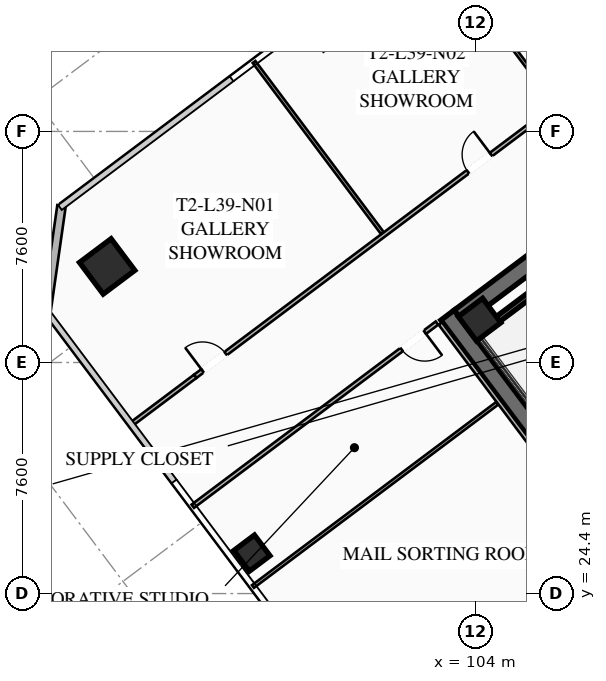
"""IFC4 building model, lengths in metres.
Left out: names, types, materials, properties, quantities, classifications, styles, units other than length and angle.
Written with IfcOpenShell. Run it as: python <this file> out.ifc"""

import sys

from ifc_helpers import new_model, si_unit, direction, frame, frame_2d, origin, origin_2d, place, context, subcontext, project, spatial, rectangle, hollow_rectangle, extrude, element, fill, save


model = new_model("IFC4")
c1 = context("Model", 3, precision=1e-05, world=origin(), true_north=direction((0.0, 1.0)))
c2 = subcontext(c1, "Body", "Model", "MODEL_VIEW")
j1 = project(units=[si_unit("LENGTHUNIT", "METRE"), si_unit("PLANEANGLEUNIT", "RADIAN")], contexts=[c1])
p1 = place(None, origin())
s1 = spatial("IfcSite", under=j1, at=p1, CompositionType="ELEMENT")
p2 = place(p1, origin())
s2 = spatial("IfcBuilding", under=s1, at=p2, CompositionType="ELEMENT")
p3 = place(p2, frame((0.0, 0.0, 146.35)))
s3 = spatial("IfcBuildingStorey", under=s2, at=p3, CompositionType="ELEMENT", Elevation=146.35)
p4 = place(p3, frame((112.436, 21.077, 0.0), z_axis=(0.0, 0.0, 1.0), x_axis=(-0.600005007985, 0.799996243986, 0.0)))
e1 = element("IfcWall", 1, at=p4, inside=s3, PredefinedType="SHEAR", context=c2, shape_type="SweptSolid", body=[
    extrude(rectangle(XDim=15.6, YDim=0.55, at=frame_2d((7.8, 0.0))), origin(), (0.0, 0.0, 1.0), 3.55),
])
p5 = place(p3, frame((103.461, 33.502, 0.0), z_axis=(0.0, 0.0, 1.0), x_axis=(0.799998054672, 0.600002593761, 0.0)))
e2 = element("IfcWall", 2, at=p5, inside=s3, PredefinedType="SHEAR", context=c2, shape_type="SweptSolid", body=[
    extrude(rectangle(XDim=15.06, YDim=0.55, at=frame_2d((7.53, 0.0))), origin(), (0.0, 0.0, 1.0), 3.55),
])
p6 = place(p5, frame((4.58, 0.0, 0.0)))
e3 = element("IfcOpeningElement", 3, at=p6, cuts=e2, PredefinedType="OPENING", context=c2, shape_type="SweptSolid", body=[
    extrude(rectangle(XDim=1.25, YDim=2.25, at=frame_2d((0.625, 1.125))), frame((0.0, 0.285, 0.0), z_axis=(0.0, -1.0, 0.0), x_axis=(1.0, 0.0, 0.0)), (0.0, 0.0, 1.0), 0.57),
])
p7 = place(p5, frame((9.63, 0.0, 0.0)))
e4 = element("IfcOpeningElement", 4, at=p7, cuts=e2, PredefinedType="OPENING", context=c2, shape_type="SweptSolid", body=[
    extrude(rectangle(XDim=1.25, YDim=2.25, at=frame_2d((0.625, 1.125))), frame((0.0, 0.285, 0.0), z_axis=(0.0, -1.0, 0.0), x_axis=(1.0, 0.0, 0.0)), (0.0, 0.0, 1.0), 0.57),
])
p8 = place(p3, frame((104.13, 33.41, 0.0), z_axis=(0.0, 0.0, 1.0), x_axis=(0.799999996291, 0.600000004945, 0.0)))
e5 = element("IfcColumn", 5, at=p8, inside=s3, PredefinedType="COLUMN", context=c2, shape_type="SweptSolid", body=[
    extrude(hollow_rectangle(XDim=1.0, YDim=1.0, WallThickness=0.04, at=origin_2d()), origin(), (0.0, 0.0, 1.0), 3.37),
])
p9 = place(p3, frame((91.88, 35.16, 0.0), z_axis=(0.0, 0.0, 1.0), x_axis=(0.799999996291, 0.600000004945, 0.0)))
e6 = element("IfcColumn", 6, at=p9, inside=s3, PredefinedType="COLUMN", context=c2, shape_type="SweptSolid", body=[
    extrude(hollow_rectangle(XDim=1.3, YDim=1.3, WallThickness=0.05, at=origin_2d()), origin(), (0.0, 0.0, 1.0), 3.37),
])
p10 = place(p3, frame((96.64, 25.73, 0.0), z_axis=(0.0, 0.0, 1.0), x_axis=(0.799999996291, 0.600000004945, 0.0)))
e7 = element("IfcColumn", 7, at=p10, inside=s3, PredefinedType="COLUMN", context=c2, shape_type="SweptSolid", body=[
    extrude(hollow_rectangle(XDim=0.85, YDim=0.85, WallThickness=0.035, at=origin_2d()), origin(), (0.0, 0.0, 1.0), 3.37),
])
p11 = place(p3, frame((89.88, 33.66, 0.0), z_axis=(0.0, 0.0, 1.0), x_axis=(0.141421356237, 0.989949493661, 0.0)))
e8 = element("IfcWall", 8, at=p11, inside=s3, PredefinedType="SOLIDWALL", context=c2, shape_type="SweptSolid", body=[
    extrude(rectangle(XDim=3.536, YDim=0.28, at=frame_2d((1.768, 0.0))), origin(), (0.0, 0.0, 1.0), 3.37),
])
p12 = place(p3, frame((103.956, 32.842, 0.0), z_axis=(0.0, 0.0, 1.0), x_axis=(0.800015298837, 0.599979601008, 0.0)))
e9 = element("IfcWall", 9, at=p12, inside=s3, PredefinedType="SHEAR", context=c2, shape_type="SweptSolid", body=[
    extrude(rectangle(XDim=3.83, YDim=0.2, at=frame_2d((1.915, 0.0))), origin(), (0.0, 0.0, 1.0), 3.37),
])
p13 = place(p3, frame((94.778, 31.546, 0.0), z_axis=(0.0, 0.0, 1.0), x_axis=(0.8, 0.6, 0.0)))
e10 = element("IfcWall", 10, at=p13, inside=s3, PredefinedType="PARTITIONING", context=c2, shape_type="SweptSolid", body=[
    extrude(rectangle(XDim=31.3, YDim=0.135, at=frame_2d((15.65, 0.0))), origin(), (0.0, 0.0, 1.0), 2.723),
])
p14 = place(p13, frame((0.3, 0.0, 0.0)))
e11 = element("IfcOpeningElement", 11, at=p14, cuts=e10, PredefinedType="OPENING", context=c2, shape_type="SweptSolid", body=[
    extrude(rectangle(XDim=0.95, YDim=2.05, at=frame_2d((0.475, 1.025))), frame((0.0, 0.077, 0.0), z_axis=(0.0, -1.0, 0.0), x_axis=(1.0, 0.0, 0.0)), (0.0, 0.0, 1.0), 0.155),
])
p15 = place(p13, frame((11.21, 0.0, 0.0)))
e12 = element("IfcOpeningElement", 12, at=p15, cuts=e10, PredefinedType="OPENING", context=c2, shape_type="SweptSolid", body=[
    extrude(rectangle(XDim=0.95, YDim=2.05, at=frame_2d((0.475, 1.025))), frame((0.0, 0.077, 0.0), z_axis=(0.0, -1.0, 0.0), x_axis=(1.0, 0.0, 0.0)), (0.0, 0.0, 1.0), 0.155),
])
p16 = place(p13, frame((15.487, 0.0, 0.0)))
e13 = element("IfcOpeningElement", 13, at=p16, cuts=e10, PredefinedType="OPENING", context=c2, shape_type="SweptSolid", body=[
    extrude(rectangle(XDim=0.95, YDim=2.05, at=frame_2d((0.475, 1.025))), frame((0.0, 0.077, 0.0), z_axis=(0.0, -1.0, 0.0), x_axis=(1.0, 0.0, 0.0)), (0.0, 0.0, 1.0), 0.155),
])
p17 = place(p13, frame((30.05, 0.0, 0.0)))
e14 = element("IfcOpeningElement", 14, at=p17, cuts=e10, PredefinedType="OPENING", context=c2, shape_type="SweptSolid", body=[
    extrude(rectangle(XDim=0.95, YDim=2.05, at=frame_2d((0.475, 1.025))), frame((0.0, 0.077, 0.0), z_axis=(0.0, -1.0, 0.0), x_axis=(1.0, 0.0, 0.0)), (0.0, 0.0, 1.0), 0.155),
])
p18 = place(p3, frame((92.674, 29.968, 0.0), z_axis=(0.0, 0.0, 1.0), x_axis=(0.80002227902, 0.599970293491, 0.0)))
e15 = element("IfcWall", 15, at=p18, inside=s3, PredefinedType="PARTITIONING", context=c2, shape_type="SweptSolid", body=[
    extrude(rectangle(XDim=2.63, YDim=0.135, at=frame_2d((1.315, 0.0))), origin(), (0.0, 0.0, 1.0), 2.723),
])
for number, where, z_axis, x_axis in (
    (16, (100.93, 36.26, 0.0), (0.0, 0.0, 1.0), (-0.6, 0.8, 0.0)),
    (17, (106.61, 40.52, 0.0), (0.0, 0.0, 1.0), (-0.6, 0.8, 0.0)),
):
    element("IfcWall", number, at=place(p3, frame(where, z_axis=z_axis, x_axis=x_axis)), inside=s3, PredefinedType="PARTITIONING", context=c2, shape_type="SweptSolid", body=[
        extrude(rectangle(XDim=7.03, YDim=0.11, at=frame_2d((3.515, 0.0))), origin(), (0.0, 0.0, 1.0), 2.723),
    ])
p19 = place(p3, frame((112.104, 20.928, 0.0), z_axis=(0.0, 0.0, 1.0), x_axis=(-0.599994940075, 0.800003794918, 0.0)))
e18 = element("IfcWall", 18, at=p19, inside=s3, PredefinedType="PARTITIONING", context=c2, shape_type="SweptSolid", body=[
    extrude(rectangle(XDim=15.44, YDim=0.135, at=frame_2d((7.72, 0.0))), origin(), (0.0, 0.0, 1.0), 2.723),
])
p20 = place(p3, frame((102.728, 33.296, 0.0), z_axis=(0.0, 0.0, 1.0), x_axis=(-0.800002918023, -0.599996109283, 0.0)))
e19 = element("IfcWall", 19, at=p20, inside=s3, PredefinedType="PARTITIONING", context=c2, shape_type="SweptSolid", body=[
    extrude(rectangle(XDim=10.04, YDim=0.135, at=frame_2d((5.02, 0.0))), origin(), (0.0, 0.0, 1.0), 2.723),
])
p21 = place(p20, frame((0.5, 0.0, 0.0)))
e20 = element("IfcOpeningElement", 20, at=p21, cuts=e19, PredefinedType="OPENING", context=c2, shape_type="SweptSolid", body=[
    extrude(rectangle(XDim=0.95, YDim=2.05, at=frame_2d((0.475, 1.025))), frame((0.0, 0.077, 0.0), z_axis=(0.0, -1.0, 0.0), x_axis=(1.0, 0.0, 0.0)), (0.0, 0.0, 1.0), 0.155),
])
p22 = place(p3, frame((96.676, 24.632, 0.0), z_axis=(0.0, 0.0, 1.0), x_axis=(0.800002918023, 0.599996109283, 0.0)))
e21 = element("IfcWall", 21, at=p22, inside=s3, PredefinedType="PARTITIONING", context=c2, shape_type="SweptSolid", body=[
    extrude(rectangle(XDim=10.04, YDim=0.11, at=frame_2d((5.02, 0.0))), origin(), (0.0, 0.0, 1.0), 2.723),
])
p23 = place(p14, origin())
e22 = element("IfcDoor", 22, at=p23, inside=s3, OperationType="SINGLE_SWING_LEFT", PredefinedType="DOOR", context=c2, shape_type="SweptSolid", body=[
    extrude(rectangle(XDim=0.95, YDim=2.05, at=frame_2d((0.475, 1.025))), frame((0.0, 0.025, 0.0), z_axis=(0.0, -1.0, 0.0), x_axis=(1.0, 0.0, 0.0)), (0.0, 0.0, 1.0), 0.05),
])
fill(e11, e22)
p24 = place(p15, origin())
e23 = element("IfcDoor", 23, at=p24, inside=s3, OperationType="SINGLE_SWING_RIGHT", PredefinedType="DOOR", context=c2, shape_type="SweptSolid", body=[
    extrude(rectangle(XDim=0.95, YDim=2.05, at=frame_2d((0.475, 1.025))), frame((0.0, 0.025, 0.0), z_axis=(0.0, -1.0, 0.0), x_axis=(1.0, 0.0, 0.0)), (0.0, 0.0, 1.0), 0.05),
])
fill(e12, e23)
p25 = place(p21, origin())
e24 = element("IfcDoor", 24, at=p25, inside=s3, OperationType="SINGLE_SWING_LEFT", PredefinedType="DOOR", context=c2, shape_type="SweptSolid", body=[
    extrude(rectangle(XDim=0.95, YDim=2.05, at=frame_2d((0.475, 1.025))), frame((0.0, 0.025, 0.0), z_axis=(0.0, -1.0, 0.0), x_axis=(1.0, 0.0, 0.0)), (0.0, 0.0, 1.0), 0.05),
])
fill(e20, e24)
save(model, sys.argv[1])
